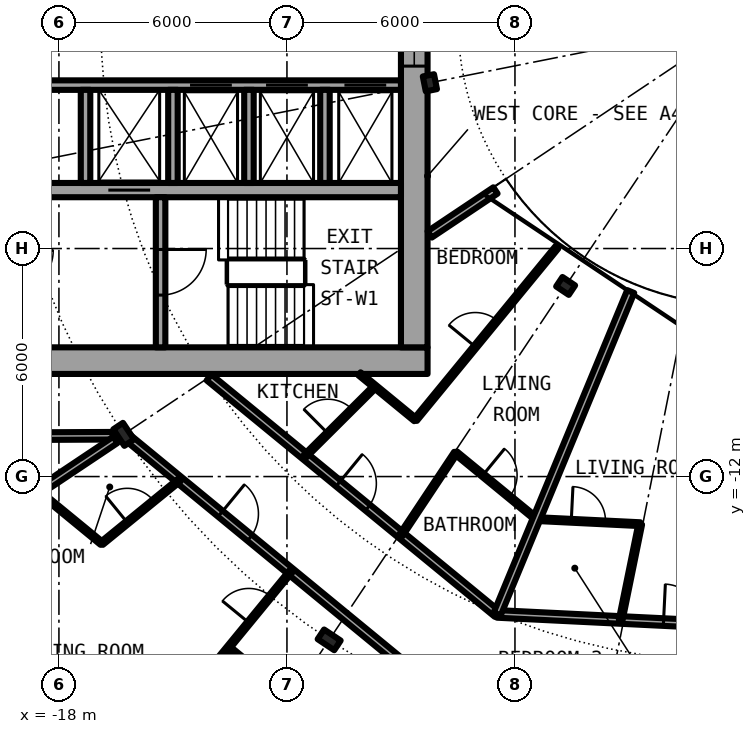
"""IFC4 building model, lengths in metres.
Left out: names, types, materials, properties, quantities, classifications, styles, units other than length and angle.
Written with IfcOpenShell. Run it as: python <this file> out.ifc"""

import sys

from ifc_helpers import new_model, si_unit, direction, frame, frame_2d, origin, origin_2d, place, context, subcontext, project, spatial, rectangle, i_section, extrude, element, fill, save


model = new_model("IFC4")
c1 = context("Model", 3, precision=1e-05, world=origin(), true_north=direction((0.0, 1.0)))
c2 = subcontext(c1, "Body", "Model", "MODEL_VIEW")
j1 = project(units=[si_unit("LENGTHUNIT", "METRE"), si_unit("PLANEANGLEUNIT", "RADIAN")], contexts=[c1])
p1 = place(None, origin())
s1 = spatial("IfcSite", under=j1, at=p1, CompositionType="ELEMENT")
p2 = place(p1, origin())
s2 = spatial("IfcBuilding", under=s1, at=p2, CompositionType="ELEMENT")
p3 = place(p2, frame((0.0, 0.0, 69.7)))
s3 = spatial("IfcBuildingStorey", under=s2, at=p3, CompositionType="ELEMENT", Elevation=69.7)
for number, where, z_axis, x_axis in (
    (1, (-16.297, -10.889, 0.0), (0.0, 0.0, 1.0), (-0.831, -0.556, 0.0)),
    (2, (-10.889, -16.297, 0.0), (0.0, 0.0, 1.0), (-0.556, -0.831, 0.0)),
):
    element("IfcColumn", number, at=place(p3, frame(where, z_axis=z_axis, x_axis=x_axis)), inside=s3, PredefinedType="COLUMN", context=c2, shape_type="SweptSolid", body=[
        extrude(i_section(OverallWidth=0.306, OverallDepth=0.524, WebThickness=0.021, FlangeThickness=0.04, FilletRadius=0.027, at=origin_2d()), origin(), (0.0, 0.0, 1.0), 3.05),
    ])
for number, where, z_axis, x_axis in (
    (3, (-8.239, -1.639, 0.0), (0.0, 0.0, 1.0), (-0.981, -0.195, 0.0)),
    (4, (-4.667, -6.984, 0.0), (0.0, 0.0, 1.0), (-0.556, -0.831, 0.0)),
):
    element("IfcColumn", number, at=place(p3, frame(where, z_axis=z_axis, x_axis=x_axis)), inside=s3, PredefinedType="COLUMN", context=c2, shape_type="SweptSolid", body=[
        extrude(i_section(OverallWidth=0.3, OverallDepth=0.4, WebThickness=0.013, FlangeThickness=0.024, FilletRadius=0.027, at=origin_2d()), origin(), (0.0, 0.0, 1.0), 3.05),
    ])
p4 = place(p3, frame((-22.3, -8.95, 0.0), z_axis=(0.0, 0.0, 1.0), x_axis=(1.0, 0.0, 0.0)))
e5 = element("IfcWall", 5, at=p4, inside=s3, PredefinedType="SHEAR", context=c2, shape_type="SweptSolid", body=[
    extrude(rectangle(XDim=14.0, YDim=0.7, at=frame_2d((7.0, 0.0))), origin(), (0.0, 0.0, 1.0), 3.05),
])
p5 = place(p4, frame((1.225, 0.0, 0.0)))
e6 = element("IfcOpeningElement", 6, at=p5, cuts=e5, PredefinedType="OPENING", context=c2, shape_type="SweptSolid", body=[
    extrude(rectangle(XDim=1.2, YDim=2.3, at=frame_2d((0.6, 1.15))), frame((0.0, 0.36, 0.0), z_axis=(0.0, -1.0, 0.0), x_axis=(1.0, 0.0, 0.0)), (0.0, 0.0, 1.0), 0.72),
])
p6 = place(p3, frame((-8.65, 8.6, 0.0), z_axis=(0.0, 0.0, 1.0), x_axis=(0.0, -1.0, 0.0)))
e7 = element("IfcWall", 7, at=p6, inside=s3, PredefinedType="SHEAR", context=c2, shape_type="SweptSolid", body=[
    extrude(rectangle(XDim=17.2, YDim=0.7, at=frame_2d((8.6, 0.0))), origin(), (0.0, 0.0, 1.0), 3.05),
])
p7 = place(p6, frame((7.4, 0.0, 0.1)))
e8 = element("IfcOpeningElement", 8, at=p7, cuts=e7, PredefinedType="OPENING", context=c2, shape_type="SweptSolid", body=[
    extrude(rectangle(XDim=2.4, YDim=2.2, at=frame_2d((1.2, 1.1))), frame((0.0, 0.36, 0.0), z_axis=(0.0, -1.0, 0.0), x_axis=(1.0, 0.0, 0.0)), (0.0, 0.0, 1.0), 0.72),
])
p8 = place(p3, frame((-9.0, -1.7, 0.0), z_axis=(0.0, 0.0, 1.0), x_axis=(-1.0, 0.0, 0.0)))
e9 = element("IfcWall", 9, at=p8, inside=s3, PredefinedType="SHEAR", context=c2, shape_type="SweptSolid", body=[
    extrude(rectangle(XDim=10.15, YDim=0.25, at=frame_2d((5.075, 0.0))), origin(), (0.0, 0.0, 1.0), 3.05),
])
p9 = place(p8, frame((0.387, 0.0, 0.0)))
e10 = element("IfcOpeningElement", 10, at=p9, cuts=e9, PredefinedType="OPENING", context=c2, shape_type="SweptSolid", body=[
    extrude(rectangle(XDim=1.1, YDim=2.3, at=frame_2d((0.55, 1.15))), frame((0.0, 0.135, 0.0), z_axis=(0.0, -1.0, 0.0), x_axis=(1.0, 0.0, 0.0)), (0.0, 0.0, 1.0), 0.27),
])
p10 = place(p8, frame((2.45, 0.0, 0.0)))
e11 = element("IfcOpeningElement", 11, at=p10, cuts=e9, PredefinedType="OPENING", context=c2, shape_type="SweptSolid", body=[
    extrude(rectangle(XDim=1.1, YDim=2.3, at=frame_2d((0.55, 1.15))), frame((0.0, 0.135, 0.0), z_axis=(0.0, -1.0, 0.0), x_axis=(1.0, 0.0, 0.0)), (0.0, 0.0, 1.0), 0.27),
])
p11 = place(p8, frame((4.45, 0.0, 0.0)))
e12 = element("IfcOpeningElement", 12, at=p11, cuts=e9, PredefinedType="OPENING", context=c2, shape_type="SweptSolid", body=[
    extrude(rectangle(XDim=1.1, YDim=2.3, at=frame_2d((0.55, 1.15))), frame((0.0, 0.135, 0.0), z_axis=(0.0, -1.0, 0.0), x_axis=(1.0, 0.0, 0.0)), (0.0, 0.0, 1.0), 0.27),
])
p12 = place(p3, frame((-9.0, -4.462, 0.0), z_axis=(0.0, 0.0, 1.0), x_axis=(-1.0, 0.0, 0.0)))
e13 = element("IfcWall", 13, at=p12, inside=s3, PredefinedType="SHEAR", context=c2, shape_type="SweptSolid", body=[
    extrude(rectangle(XDim=10.15, YDim=0.375, at=frame_2d((5.075, 0.0))), origin(), (0.0, 0.0, 1.0), 3.05),
])
p13 = place(p12, frame((6.6, 0.0, 0.0)))
e14 = element("IfcOpeningElement", 14, at=p13, cuts=e13, PredefinedType="OPENING", context=c2, shape_type="SweptSolid", body=[
    extrude(rectangle(XDim=1.1, YDim=2.3, at=frame_2d((0.55, 1.15))), frame((0.0, 0.198, 0.0), z_axis=(0.0, -1.0, 0.0), x_axis=(1.0, 0.0, 0.0)), (0.0, 0.0, 1.0), 0.395),
])
p14 = place(p3, frame((-15.325, -4.65, 0.0), z_axis=(0.0, 0.0, 1.0), x_axis=(0.0, -1.0, 0.0)))
e15 = element("IfcWall", 15, at=p14, inside=s3, PredefinedType="SHEAR", context=c2, shape_type="SweptSolid", body=[
    extrude(rectangle(XDim=3.95, YDim=0.25, at=frame_2d((1.975, 0.0))), origin(), (0.0, 0.0, 1.0), 3.05),
])
p15 = place(p14, frame((1.375, 0.0, 0.0)))
e16 = element("IfcOpeningElement", 16, at=p15, cuts=e15, PredefinedType="OPENING", context=c2, shape_type="SweptSolid", body=[
    extrude(rectangle(XDim=1.2, YDim=2.3, at=frame_2d((0.6, 1.15))), frame((0.0, 0.135, 0.0), z_axis=(0.0, -1.0, 0.0), x_axis=(1.0, 0.0, 0.0)), (0.0, 0.0, 1.0), 0.27),
])
for number, where, z_axis, x_axis in (
    (17, (-15.0, -1.825, 0.0), (0.0, 0.0, 1.0), (0.0, -1.0, 0.0)),
    (18, (-17.3, -1.825, 0.0), (0.0, 0.0, 1.0), (0.0, -1.0, 0.0)),
    (19, (-11.0, -1.825, 0.0), (0.0, 0.0, 1.0), (0.0, -1.0, 0.0)),
    (20, (-13.0, -1.825, 0.0), (0.0, 0.0, 1.0), (0.0, -1.0, 0.0)),
):
    element("IfcWall", number, at=place(p3, frame(where, z_axis=z_axis, x_axis=x_axis)), inside=s3, PredefinedType="SOLIDWALL", context=c2, shape_type="SweptSolid", body=[
        extrude(rectangle(XDim=2.45, YDim=0.25, at=frame_2d((1.225, 0.0))), origin(), (0.0, 0.0, 1.0), 2.7),
    ])
p16 = place(p3, frame((-18.542, -12.389, 0.0), z_axis=(0.0, 0.0, 1.0), x_axis=(0.772948171844, -0.634469166818, 0.0)))
e21 = element("IfcWall", 21, at=p16, inside=s3, PredefinedType="PARTITIONING", context=c2, shape_type="SweptSolid", body=[
    extrude(rectangle(XDim=2.158, YDim=0.1, at=frame_2d((1.079, 0.0))), origin(), (0.0, 0.0, 1.0), 2.7),
])
p17 = place(p3, frame((-13.538, -16.496, 0.0), z_axis=(0.0, 0.0, 1.0), x_axis=(0.773000340237, -0.634405606843, 0.0)))
e22 = element("IfcWall", 22, at=p17, inside=s3, PredefinedType="PARTITIONING", context=c2, shape_type="SweptSolid", body=[
    extrude(rectangle(XDim=6.474, YDim=0.1, at=frame_2d((3.237, 0.0))), origin(), (0.0, 0.0, 1.0), 2.7),
])
p18 = place(p3, frame((-16.172, -10.99, 0.0), z_axis=(0.0, 0.0, 1.0), x_axis=(0.772669779479, -0.634808169355, 0.0)))
e23 = element("IfcWall", 23, at=p18, inside=s3, PredefinedType="PARTITIONING", context=c2, shape_type="SweptSolid", body=[
    extrude(rectangle(XDim=11.208, YDim=0.2, at=frame_2d((5.604, 0.0))), origin(), (0.0, 0.0, 1.0), 2.38),
])
p19 = place(p18, frame((3.135, 0.0, 0.0)))
e24 = element("IfcOpeningElement", 24, at=p19, cuts=e23, PredefinedType="OPENING", context=c2, shape_type="SweptSolid", body=[
    extrude(rectangle(XDim=1.0, YDim=2.3, at=frame_2d((0.5, 1.15))), frame((0.0, 0.11, 0.0), z_axis=(0.0, -1.0, 0.0), x_axis=(1.0, 0.0, 0.0)), (0.0, 0.0, 1.0), 0.22),
])
p20 = place(p3, frame((-14.05, -9.392, 0.0), z_axis=(0.0, 0.0, 1.0), x_axis=(0.773074935257, -0.634314704605, 0.0)))
e25 = element("IfcWall", 25, at=p20, inside=s3, PredefinedType="PARTITIONING", context=c2, shape_type="SweptSolid", body=[
    extrude(rectangle(XDim=9.809, YDim=0.2, at=frame_2d((4.904, 0.0))), origin(), (0.0, 0.0, 1.0), 2.7),
])
p21 = place(p20, frame((4.402, 0.0, 0.0)))
e26 = element("IfcOpeningElement", 26, at=p21, cuts=e25, PredefinedType="OPENING", context=c2, shape_type="SweptSolid", body=[
    extrude(rectangle(XDim=1.0, YDim=2.3, at=frame_2d((0.5, 1.15))), frame((0.0, 0.11, 0.0), z_axis=(0.0, -1.0, 0.0), x_axis=(1.0, 0.0, 0.0)), (0.0, 0.0, 1.0), 0.22),
])
p22 = place(p3, frame((-6.469, -15.614, 0.0), z_axis=(0.0, 0.0, 1.0), x_axis=(0.998798520108, -0.049005267363, 0.0)))
e27 = element("IfcWall", 27, at=p22, inside=s3, PredefinedType="PARTITIONING", context=c2, shape_type="SweptSolid", body=[
    extrude(rectangle(XDim=11.389, YDim=0.2, at=frame_2d((5.694, 0.0))), origin(), (0.0, 0.0, 1.0), 2.7),
])
p23 = place(p22, frame((4.383, 0.0, 0.0)))
e28 = element("IfcOpeningElement", 28, at=p23, cuts=e27, PredefinedType="OPENING", context=c2, shape_type="SweptSolid", body=[
    extrude(rectangle(XDim=1.0, YDim=2.3, at=frame_2d((0.5, 1.15))), frame((0.0, 0.11, 0.0), z_axis=(0.0, -1.0, 0.0), x_axis=(1.0, 0.0, 0.0)), (0.0, 0.0, 1.0), 0.22),
])
p24 = place(p3, frame((-10.093, -9.296, 0.0), z_axis=(0.0, 0.0, 1.0), x_axis=(0.772957368531, -0.6344579627, 0.0)))
e29 = element("IfcWall", 29, at=p24, inside=s3, PredefinedType="PARTITIONING", context=c2, shape_type="SweptSolid", body=[
    extrude(rectangle(XDim=1.906, YDim=0.1, at=frame_2d((0.953, 0.0))), origin(), (0.0, 0.0, 1.0), 2.7),
])
p25 = place(p3, frame((-7.558, -11.376, 0.0), z_axis=(0.0, 0.0, 1.0), x_axis=(0.773049907698, -0.634345205868, 0.0)))
e30 = element("IfcWall", 30, at=p25, inside=s3, PredefinedType="PARTITIONING", context=c2, shape_type="SweptSolid", body=[
    extrude(rectangle(XDim=2.748, YDim=0.1, at=frame_2d((1.374, 0.0))), origin(), (0.0, 0.0, 1.0), 2.7),
])
p26 = place(p25, frame((0.924, 0.0, 0.0)))
e31 = element("IfcOpeningElement", 31, at=p26, cuts=e30, PredefinedType="OPENING", context=c2, shape_type="SweptSolid", body=[
    extrude(rectangle(XDim=0.9, YDim=2.3, at=frame_2d((0.45, 1.15))), frame((0.0, 0.06, 0.0), z_axis=(0.0, -1.0, 0.0), x_axis=(1.0, 0.0, 0.0)), (0.0, 0.0, 1.0), 0.12),
])
p27 = place(p3, frame((-5.434, -13.119, 0.0), z_axis=(0.0, 0.0, 1.0), x_axis=(0.998796928508, -0.049037695739, 0.0)))
e32 = element("IfcWall", 32, at=p27, inside=s3, PredefinedType="PARTITIONING", context=c2, shape_type="SweptSolid", body=[
    extrude(rectangle(XDim=2.733, YDim=0.1, at=frame_2d((1.367, 0.0))), origin(), (0.0, 0.0, 1.0), 2.7),
])
p28 = place(p27, frame((0.917, 0.0, 0.0)))
e33 = element("IfcOpeningElement", 33, at=p28, cuts=e32, PredefinedType="OPENING", context=c2, shape_type="SweptSolid", body=[
    extrude(rectangle(XDim=0.9, YDim=2.3, at=frame_2d((0.45, 1.15))), frame((0.0, 0.06, 0.0), z_axis=(0.0, -1.0, 0.0), x_axis=(1.0, 0.0, 0.0)), (0.0, 0.0, 1.0), 0.12),
])
p29 = place(p3, frame((-21.675, -10.95, 0.0), z_axis=(0.0, 0.0, 1.0), x_axis=(0.999988944514, 0.004702217579, 0.0)))
e34 = element("IfcWall", 34, at=p29, inside=s3, PredefinedType="PARTITIONING", context=c2, shape_type="SweptSolid", body=[
    extrude(rectangle(XDim=5.088, YDim=0.2, at=frame_2d((2.544, 0.0))), origin(), (0.0, 0.0, 1.0), 2.7),
])
p30 = place(p29, frame((2.162, 0.0, 0.0)))
e35 = element("IfcOpeningElement", 35, at=p30, cuts=e34, PredefinedType="OPENING", context=c2, shape_type="SweptSolid", body=[
    extrude(rectangle(XDim=1.0, YDim=2.3, at=frame_2d((0.5, 1.15))), frame((0.0, 0.11, 0.0), z_axis=(0.0, -1.0, 0.0), x_axis=(1.0, 0.0, 0.0)), (0.0, 0.0, 1.0), 0.22),
])
p31 = place(p3, frame((-6.513, -4.472, 0.0), z_axis=(0.0, 0.0, 1.0), x_axis=(-0.831382204863, -0.555701025225, 0.0)))
e36 = element("IfcWall", 36, at=p31, inside=s3, PredefinedType="PARTITIONING", context=c2, shape_type="SweptSolid", body=[
    extrude(rectangle(XDim=2.082, YDim=0.2, at=frame_2d((1.041, 0.0))), origin(), (0.0, 0.0, 1.0), 2.7),
])
p32 = place(p3, frame((-22.595, -15.097, 0.0), z_axis=(0.0, 0.0, 1.0), x_axis=(0.831505405283, 0.555516661303, 0.0)))
e37 = element("IfcWall", 37, at=p32, inside=s3, PredefinedType="PARTITIONING", context=c2, shape_type="SweptSolid", body=[
    extrude(rectangle(XDim=7.312, YDim=0.2, at=frame_2d((3.656, 0.0))), origin(), (0.0, 0.0, 1.0), 2.7),
])
p33 = place(p3, frame((-17.24, -21.007, 0.0), z_axis=(0.0, 0.0, 1.0), x_axis=(0.634396151441, 0.77300810024, 0.0)))
e38 = element("IfcWall", 38, at=p33, inside=s3, PredefinedType="PARTITIONING", context=c2, shape_type="SweptSolid", body=[
    extrude(rectangle(XDim=8.419, YDim=0.1, at=frame_2d((4.209, 0.0))), origin(), (0.0, 0.0, 1.0), 2.7),
])
p34 = place(p33, frame((6.679, 0.0, 0.0)))
e39 = element("IfcOpeningElement", 39, at=p34, cuts=e38, PredefinedType="OPENING", context=c2, shape_type="SweptSolid", body=[
    extrude(rectangle(XDim=0.9, YDim=2.3, at=frame_2d((0.45, 1.15))), frame((0.0, 0.06, 0.0), z_axis=(0.0, -1.0, 0.0), x_axis=(1.0, 0.0, 0.0)), (0.0, 0.0, 1.0), 0.12),
])
p35 = place(p33, frame((2.468, 0.0, 0.0)))
e40 = element("IfcOpeningElement", 40, at=p35, cuts=e38, PredefinedType="OPENING", context=c2, shape_type="SweptSolid", body=[
    extrude(rectangle(XDim=0.9, YDim=2.3, at=frame_2d((0.45, 1.15))), frame((0.0, 0.06, 0.0), z_axis=(0.0, -1.0, 0.0), x_axis=(1.0, 0.0, 0.0)), (0.0, 0.0, 1.0), 0.12),
])
p36 = place(p3, frame((-16.874, -13.758, 0.0), z_axis=(0.0, 0.0, 1.0), x_axis=(0.774979608522, 0.631986239072, 0.0)))
e41 = element("IfcWall", 41, at=p36, inside=s3, PredefinedType="PARTITIONING", context=c2, shape_type="SweptSolid", body=[
    extrude(rectangle(XDim=2.636, YDim=0.1, at=frame_2d((1.318, 0.0))), origin(), (0.0, 0.0, 1.0), 2.7),
])
p37 = place(p36, frame((0.868, 0.0, 0.0)))
e42 = element("IfcOpeningElement", 42, at=p37, cuts=e41, PredefinedType="OPENING", context=c2, shape_type="SweptSolid", body=[
    extrude(rectangle(XDim=0.9, YDim=2.3, at=frame_2d((0.45, 1.15))), frame((0.0, 0.06, 0.0), z_axis=(0.0, -1.0, 0.0), x_axis=(1.0, 0.0, 0.0)), (0.0, 0.0, 1.0), 0.12),
])
p38 = place(p3, frame((-11.524, -11.464, 0.0), z_axis=(0.0, 0.0, 1.0), x_axis=(0.708796844581, 0.705412668665, 0.0)))
e43 = element("IfcWall", 43, at=p38, inside=s3, PredefinedType="PARTITIONING", context=c2, shape_type="SweptSolid", body=[
    extrude(rectangle(XDim=2.597, YDim=0.1, at=frame_2d((1.299, 0.0))), origin(), (0.0, 0.0, 1.0), 2.7),
])
p39 = place(p38, frame((0.849, 0.0, 0.0)))
e44 = element("IfcOpeningElement", 44, at=p39, cuts=e43, PredefinedType="OPENING", context=c2, shape_type="SweptSolid", body=[
    extrude(rectangle(XDim=0.9, YDim=2.3, at=frame_2d((0.45, 1.15))), frame((0.0, 0.06, 0.0), z_axis=(0.0, -1.0, 0.0), x_axis=(1.0, 0.0, 0.0)), (0.0, 0.0, 1.0), 0.12),
])
p40 = place(p3, frame((-8.996, -13.539, 0.0), z_axis=(0.0, 0.0, 1.0), x_axis=(0.553615197403, 0.83277260594, 0.0)))
e45 = element("IfcWall", 45, at=p40, inside=s3, PredefinedType="PARTITIONING", context=c2, shape_type="SweptSolid", body=[
    extrude(rectangle(XDim=2.597, YDim=0.1, at=frame_2d((1.299, 0.0))), origin(), (0.0, 0.0, 1.0), 2.7),
])
p41 = place(p3, frame((-8.62, -10.504, 0.0), z_axis=(0.0, 0.0, 1.0), x_axis=(0.634539754242, 0.772890225249, 0.0)))
e46 = element("IfcWall", 46, at=p41, inside=s3, PredefinedType="PARTITIONING", context=c2, shape_type="SweptSolid", body=[
    extrude(rectangle(XDim=5.867, YDim=0.1, at=frame_2d((2.934, 0.0))), origin(), (0.0, 0.0, 1.0), 2.7),
])
p42 = place(p41, frame((2.484, 0.0, 0.0)))
e47 = element("IfcOpeningElement", 47, at=p42, cuts=e46, PredefinedType="OPENING", context=c2, shape_type="SweptSolid", body=[
    extrude(rectangle(XDim=0.9, YDim=2.3, at=frame_2d((0.45, 1.15))), frame((0.0, 0.06, 0.0), z_axis=(0.0, -1.0, 0.0), x_axis=(1.0, 0.0, 0.0)), (0.0, 0.0, 1.0), 0.12),
])
p43 = place(p3, frame((-6.467, -15.614, 0.0), z_axis=(0.0, 0.0, 1.0), x_axis=(0.382646942224, 0.923894646378, 0.0)))
e48 = element("IfcWall", 48, at=p43, inside=s3, PredefinedType="PARTITIONING", context=c2, shape_type="SweptSolid", body=[
    extrude(rectangle(XDim=9.181, YDim=0.2, at=frame_2d((4.59, 0.0))), origin(), (0.0, 0.0, 1.0), 2.7),
])
p44 = place(p3, frame((-3.218, -15.773, 0.0), z_axis=(0.0, 0.0, 1.0), x_axis=(0.199820523641, 0.979832515449, 0.0)))
e49 = element("IfcWall", 49, at=p44, inside=s3, PredefinedType="PARTITIONING", context=c2, shape_type="SweptSolid", body=[
    extrude(rectangle(XDim=2.572, YDim=0.1, at=frame_2d((1.286, 0.0))), origin(), (0.0, 0.0, 1.0), 2.7),
])
p45 = place(p9, origin())
e50 = element("IfcDoor", 50, at=p45, inside=s3, OperationType="DOUBLE_DOOR_SLIDING", PredefinedType="DOOR", context=c2, shape_type="SweptSolid", body=[
    extrude(rectangle(XDim=1.1, YDim=2.3, at=frame_2d((0.55, 1.15))), frame((0.0, 0.025, 0.0), z_axis=(0.0, -1.0, 0.0), x_axis=(1.0, 0.0, 0.0)), (0.0, 0.0, 1.0), 0.05),
])
fill(e10, e50)
p46 = place(p10, origin())
e51 = element("IfcDoor", 51, at=p46, inside=s3, OperationType="DOUBLE_DOOR_SLIDING", PredefinedType="DOOR", context=c2, shape_type="SweptSolid", body=[
    extrude(rectangle(XDim=1.1, YDim=2.3, at=frame_2d((0.55, 1.15))), frame((0.0, 0.025, 0.0), z_axis=(0.0, -1.0, 0.0), x_axis=(1.0, 0.0, 0.0)), (0.0, 0.0, 1.0), 0.05),
])
fill(e11, e51)
p47 = place(p11, origin())
e52 = element("IfcDoor", 52, at=p47, inside=s3, OperationType="DOUBLE_DOOR_SLIDING", PredefinedType="DOOR", context=c2, shape_type="SweptSolid", body=[
    extrude(rectangle(XDim=1.1, YDim=2.3, at=frame_2d((0.55, 1.15))), frame((0.0, 0.025, 0.0), z_axis=(0.0, -1.0, 0.0), x_axis=(1.0, 0.0, 0.0)), (0.0, 0.0, 1.0), 0.05),
])
fill(e12, e52)
p48 = place(p13, origin())
e53 = element("IfcDoor", 53, at=p48, inside=s3, OperationType="DOUBLE_DOOR_SLIDING", PredefinedType="DOOR", context=c2, shape_type="SweptSolid", body=[
    extrude(rectangle(XDim=1.1, YDim=2.3, at=frame_2d((0.55, 1.15))), frame((0.0, 0.025, 0.0), z_axis=(0.0, -1.0, 0.0), x_axis=(1.0, 0.0, 0.0)), (0.0, 0.0, 1.0), 0.05),
])
fill(e14, e53)
p49 = place(p15, origin())
e54 = element("IfcDoor", 54, at=p49, inside=s3, OperationType="SINGLE_SWING_LEFT", PredefinedType="DOOR", context=c2, shape_type="SweptSolid", body=[
    extrude(rectangle(XDim=1.2, YDim=2.3, at=frame_2d((0.6, 1.15))), frame((0.0, 0.025, 0.0), z_axis=(0.0, -1.0, 0.0), x_axis=(1.0, 0.0, 0.0)), (0.0, 0.0, 1.0), 0.05),
])
fill(e16, e54)
p50 = place(p7, origin())
e55 = element("IfcWindow", 55, at=p50, inside=s3, PartitioningType="SINGLE_PANEL", PredefinedType="WINDOW", context=c2, shape_type="SweptSolid", body=[
    extrude(rectangle(XDim=2.4, YDim=2.2, at=frame_2d((1.2, 1.1))), frame((0.0, 0.03, 0.0), z_axis=(0.0, -1.0, 0.0), x_axis=(1.0, 0.0, 0.0)), (0.0, 0.0, 1.0), 0.06),
])
fill(e8, e55)
p51 = place(p19, origin())
e56 = element("IfcDoor", 56, at=p51, inside=s3, OperationType="SINGLE_SWING_LEFT", PredefinedType="DOOR", context=c2, shape_type="SweptSolid", body=[
    extrude(rectangle(XDim=1.0, YDim=2.3, at=frame_2d((0.5, 1.15))), frame((0.0, 0.025, 0.0), z_axis=(0.0, -1.0, 0.0), x_axis=(1.0, 0.0, 0.0)), (0.0, 0.0, 1.0), 0.05),
])
fill(e24, e56)
p52 = place(p37, origin())
e57 = element("IfcDoor", 57, at=p52, inside=s3, OperationType="SINGLE_SWING_LEFT", PredefinedType="DOOR", context=c2, shape_type="SweptSolid", body=[
    extrude(rectangle(XDim=0.9, YDim=2.3, at=frame_2d((0.45, 1.15))), frame((0.0, 0.025, 0.0), z_axis=(0.0, -1.0, 0.0), x_axis=(1.0, 0.0, 0.0)), (0.0, 0.0, 1.0), 0.05),
])
fill(e42, e57)
p53 = place(p34, origin())
e58 = element("IfcDoor", 58, at=p53, inside=s3, OperationType="SINGLE_SWING_RIGHT", PredefinedType="DOOR", context=c2, shape_type="SweptSolid", body=[
    extrude(rectangle(XDim=0.9, YDim=2.3, at=frame_2d((0.45, 1.15))), frame((0.0, 0.025, 0.0), z_axis=(0.0, -1.0, 0.0), x_axis=(1.0, 0.0, 0.0)), (0.0, 0.0, 1.0), 0.05),
])
fill(e39, e58)
p54 = place(p21, origin())
e59 = element("IfcDoor", 59, at=p54, inside=s3, OperationType="SINGLE_SWING_LEFT", PredefinedType="DOOR", context=c2, shape_type="SweptSolid", body=[
    extrude(rectangle(XDim=1.0, YDim=2.3, at=frame_2d((0.5, 1.15))), frame((0.0, 0.025, 0.0), z_axis=(0.0, -1.0, 0.0), x_axis=(1.0, 0.0, 0.0)), (0.0, 0.0, 1.0), 0.05),
])
fill(e26, e59)
p55 = place(p26, origin())
e60 = element("IfcDoor", 60, at=p55, inside=s3, OperationType="SINGLE_SWING_LEFT", PredefinedType="DOOR", context=c2, shape_type="SweptSolid", body=[
    extrude(rectangle(XDim=0.9, YDim=2.3, at=frame_2d((0.45, 1.15))), frame((0.0, 0.025, 0.0), z_axis=(0.0, -1.0, 0.0), x_axis=(1.0, 0.0, 0.0)), (0.0, 0.0, 1.0), 0.05),
])
fill(e31, e60)
p56 = place(p39, origin())
e61 = element("IfcDoor", 61, at=p56, inside=s3, OperationType="SINGLE_SWING_RIGHT", PredefinedType="DOOR", context=c2, shape_type="SweptSolid", body=[
    extrude(rectangle(XDim=0.9, YDim=2.3, at=frame_2d((0.45, 1.15))), frame((0.0, 0.025, 0.0), z_axis=(0.0, -1.0, 0.0), x_axis=(1.0, 0.0, 0.0)), (0.0, 0.0, 1.0), 0.05),
])
fill(e44, e61)
p57 = place(p42, origin())
e62 = element("IfcDoor", 62, at=p57, inside=s3, OperationType="SINGLE_SWING_RIGHT", PredefinedType="DOOR", context=c2, shape_type="SweptSolid", body=[
    extrude(rectangle(XDim=0.9, YDim=2.3, at=frame_2d((0.45, 1.15))), frame((0.0, 0.025, 0.0), z_axis=(0.0, -1.0, 0.0), x_axis=(1.0, 0.0, 0.0)), (0.0, 0.0, 1.0), 0.05),
])
fill(e47, e62)
p58 = place(p23, origin())
e63 = element("IfcDoor", 63, at=p58, inside=s3, OperationType="SINGLE_SWING_LEFT", PredefinedType="DOOR", context=c2, shape_type="SweptSolid", body=[
    extrude(rectangle(XDim=1.0, YDim=2.3, at=frame_2d((0.5, 1.15))), frame((0.0, 0.025, 0.0), z_axis=(0.0, -1.0, 0.0), x_axis=(1.0, 0.0, 0.0)), (0.0, 0.0, 1.0), 0.05),
])
fill(e28, e63)
p59 = place(p28, origin())
e64 = element("IfcDoor", 64, at=p59, inside=s3, OperationType="SINGLE_SWING_LEFT", PredefinedType="DOOR", context=c2, shape_type="SweptSolid", body=[
    extrude(rectangle(XDim=0.9, YDim=2.3, at=frame_2d((0.45, 1.15))), frame((0.0, 0.025, 0.0), z_axis=(0.0, -1.0, 0.0), x_axis=(1.0, 0.0, 0.0)), (0.0, 0.0, 1.0), 0.05),
])
fill(e33, e64)
save(model, sys.argv[1])
